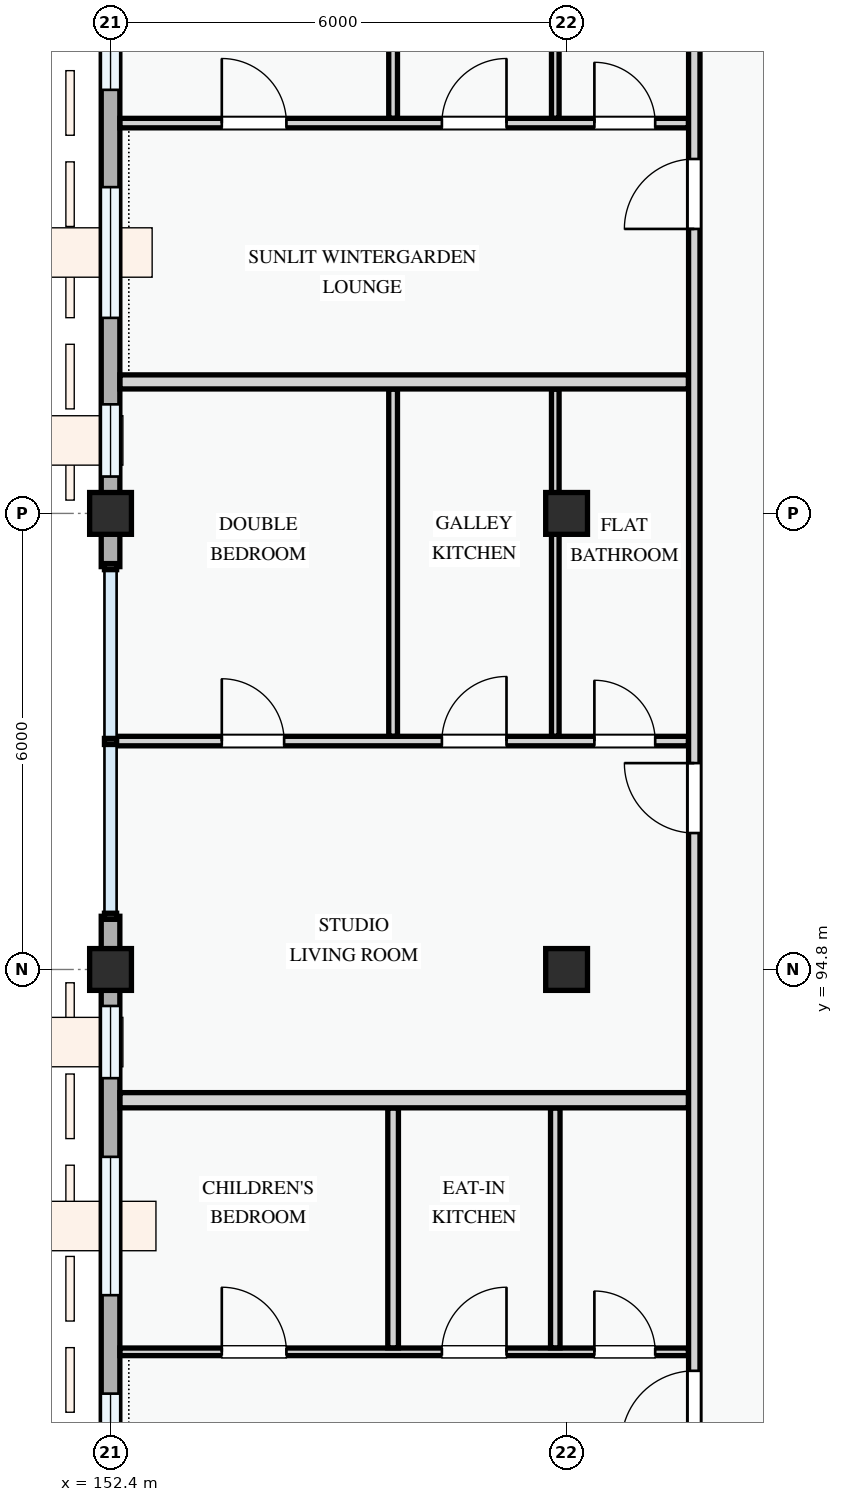
"""IFC4 building model, lengths in metres.
Left out: names, types, materials, properties, quantities, classifications, styles, units other than length and angle.
Written with IfcOpenShell. Run it as: python <this file> out.ifc"""

import sys

from ifc_helpers import new_model, si_unit, direction, frame, frame_2d, origin, origin_2d, place, context, subcontext, project, spatial, rectangle, extrude, element, fill, save


model = new_model("IFC4")
c1 = context("Model", 3, precision=1e-05, world=origin(), true_north=direction((0.0, 1.0)))
c2 = subcontext(c1, "Body", "Model", "MODEL_VIEW")
j1 = project(units=[si_unit("LENGTHUNIT", "METRE"), si_unit("PLANEANGLEUNIT", "RADIAN")], contexts=[c1])
p1 = place(None, origin())
s1 = spatial("IfcSite", under=j1, at=p1, CompositionType="ELEMENT")
p2 = place(p1, origin())
s2 = spatial("IfcBuilding", under=s1, at=p2, CompositionType="ELEMENT")
p3 = place(p2, frame((0.0, 0.0, 37.8)))
s3 = spatial("IfcBuildingStorey", under=s2, at=p3, CompositionType="ELEMENT", Elevation=37.8)
for number, where, z_axis, x_axis in (
    (1, (152.4, 94.8, 0.0), (0.0, 0.0, 1.0), (1.0, 0.0, 0.0)),
    (2, (152.4, 100.8, 0.0), (0.0, 0.0, 1.0), (1.0, 0.0, 0.0)),
    (3, (158.4, 94.8, 0.0), (0.0, 0.0, 1.0), (1.0, 0.0, 0.0)),
    (4, (158.4, 100.8, 0.0), (0.0, 0.0, 1.0), (1.0, 0.0, 0.0)),
):
    element("IfcColumn", number, at=place(p3, frame(where, z_axis=z_axis, x_axis=x_axis)), inside=s3, PredefinedType="COLUMN", context=c2, shape_type="SweptSolid", body=[
        extrude(rectangle(XDim=0.55, YDim=0.55, at=origin_2d()), origin(), (0.0, 0.0, 1.0), 3.3),
    ])
p4 = place(p3, frame((152.4, 109.2, 0.0), z_axis=(0.0, 0.0, 1.0), x_axis=(0.0, -1.0, 0.0)))
e5 = element("IfcWall", 5, at=p4, inside=s3, PredefinedType="STANDARD", context=c2, shape_type="SweptSolid", body=[
    extrude(rectangle(XDim=8.4, YDim=0.245, at=frame_2d((4.2, 0.0))), origin(), (0.0, 0.0, 1.0), 2.425),
])
p5 = place(p4, frame((0.627, 0.0, 0.78)))
e6 = element("IfcOpeningElement", 6, at=p5, cuts=e5, PredefinedType="OPENING", context=c2, shape_type="SweptSolid", body=[
    extrude(rectangle(XDim=2.2, YDim=1.5, at=frame_2d((1.1, 0.75))), frame((0.0, 0.133, 0.0), z_axis=(0.0, -1.0, 0.0), x_axis=(1.0, 0.0, 0.0)), (0.0, 0.0, 1.0), 0.265),
])
p6 = place(p4, frame((4.107, 0.0, 0.78)))
e7 = element("IfcOpeningElement", 7, at=p6, cuts=e5, PredefinedType="OPENING", context=c2, shape_type="SweptSolid", body=[
    extrude(rectangle(XDim=1.72, YDim=1.52, at=frame_2d((0.86, 0.76))), frame((0.0, 0.133, 0.0), z_axis=(0.0, -1.0, 0.0), x_axis=(1.0, 0.0, 0.0)), (0.0, 0.0, 1.0), 0.265),
])
p7 = place(p4, frame((6.965, 0.0, 0.78)))
e8 = element("IfcOpeningElement", 8, at=p7, cuts=e5, PredefinedType="OPENING", context=c2, shape_type="SweptSolid", body=[
    extrude(rectangle(XDim=0.95, YDim=1.15, at=frame_2d((0.475, 0.575))), frame((0.0, 0.133, 0.0), z_axis=(0.0, -1.0, 0.0), x_axis=(1.0, 0.0, 0.0)), (0.0, 0.0, 1.0), 0.265),
])
for number, where, z_axis, x_axis in (
    (9, (152.4, 100.8, 0.0), (0.0, 0.0, 1.0), (0.0, -1.0, 0.0)),
    (10, (152.4, 95.5, 0.0), (0.0, 0.0, 1.0), (0.0, -1.0, 0.0)),
):
    element("IfcWall", number, at=place(p3, frame(where, z_axis=z_axis, x_axis=x_axis)), inside=s3, PredefinedType="STANDARD", context=c2, shape_type="SweptSolid", body=[
        extrude(rectangle(XDim=0.7, YDim=0.245, at=frame_2d((0.35, 0.0))), origin(), (0.0, 0.0, 1.0), 2.575),
    ])
p8 = place(p3, frame((152.4, 94.8, 0.0), z_axis=(0.0, 0.0, 1.0), x_axis=(0.0, -1.0, 0.0)))
e11 = element("IfcWall", 11, at=p8, inside=s3, PredefinedType="STANDARD", context=c2, shape_type="SweptSolid", body=[
    extrude(rectangle(XDim=8.4, YDim=0.245, at=frame_2d((4.2, 0.0))), origin(), (0.0, 0.0, 1.0), 2.425),
])
p9 = place(p8, frame((0.48, 0.0, 0.78)))
e12 = element("IfcOpeningElement", 12, at=p9, cuts=e11, PredefinedType="OPENING", context=c2, shape_type="SweptSolid", body=[
    extrude(rectangle(XDim=0.95, YDim=1.15, at=frame_2d((0.475, 0.575))), frame((0.0, 0.133, 0.0), z_axis=(0.0, -1.0, 0.0), x_axis=(1.0, 0.0, 0.0)), (0.0, 0.0, 1.0), 0.265),
])
p10 = place(p8, frame((2.465, 0.0, 0.78)))
e13 = element("IfcOpeningElement", 13, at=p10, cuts=e11, PredefinedType="OPENING", context=c2, shape_type="SweptSolid", body=[
    extrude(rectangle(XDim=1.82, YDim=1.46, at=frame_2d((0.91, 0.73))), frame((0.0, 0.133, 0.0), z_axis=(0.0, -1.0, 0.0), x_axis=(1.0, 0.0, 0.0)), (0.0, 0.0, 1.0), 0.265),
])
p11 = place(p8, frame((5.58, 0.0, 0.78)))
e14 = element("IfcOpeningElement", 14, at=p11, cuts=e11, PredefinedType="OPENING", context=c2, shape_type="SweptSolid", body=[
    extrude(rectangle(XDim=2.08, YDim=1.52, at=frame_2d((1.04, 0.76))), frame((0.0, 0.133, 0.0), z_axis=(0.0, -1.0, 0.0), x_axis=(1.0, 0.0, 0.0)), (0.0, 0.0, 1.0), 0.265),
])
p12 = place(p3, frame((152.524, 89.77, 0.0), z_axis=(0.0, 0.0, 1.0), x_axis=(1.0, 0.0, 0.0)))
e15 = element("IfcWall", 15, at=p12, inside=s3, PredefinedType="PARTITIONING", context=c2, shape_type="SweptSolid", body=[
    extrude(rectangle(XDim=7.479, YDim=0.1, at=frame_2d((3.739, 0.0))), origin(), (0.0, 0.0, 1.0), 3.0),
])
p13 = place(p12, frame((1.339, 0.0, 0.0)))
e16 = element("IfcOpeningElement", 16, at=p13, cuts=e15, PredefinedType="OPENING", context=c2, shape_type="SweptSolid", body=[
    extrude(rectangle(XDim=0.85, YDim=2.1, at=frame_2d((0.425, 1.05))), frame((0.0, 0.06, 0.0), z_axis=(0.0, -1.0, 0.0), x_axis=(1.0, 0.0, 0.0)), (0.0, 0.0, 1.0), 0.12),
])
p14 = place(p12, frame((4.235, 0.0, 0.0)))
e17 = element("IfcOpeningElement", 17, at=p14, cuts=e15, PredefinedType="OPENING", context=c2, shape_type="SweptSolid", body=[
    extrude(rectangle(XDim=0.85, YDim=2.1, at=frame_2d((0.425, 1.05))), frame((0.0, 0.06, 0.0), z_axis=(0.0, -1.0, 0.0), x_axis=(1.0, 0.0, 0.0)), (0.0, 0.0, 1.0), 0.12),
])
p15 = place(p12, frame((6.241, 0.0, 0.0)))
e18 = element("IfcOpeningElement", 18, at=p15, cuts=e15, PredefinedType="OPENING", context=c2, shape_type="SweptSolid", body=[
    extrude(rectangle(XDim=0.8, YDim=2.1, at=frame_2d((0.4, 1.05))), frame((0.0, 0.06, 0.0), z_axis=(0.0, -1.0, 0.0), x_axis=(1.0, 0.0, 0.0)), (0.0, 0.0, 1.0), 0.12),
])
p16 = place(p3, frame((156.118, 89.822, 0.0), z_axis=(0.0, 0.0, 1.0), x_axis=(0.0, 1.0, 0.0)))
e19 = element("IfcWall", 19, at=p16, inside=s3, PredefinedType="PARTITIONING", context=c2, shape_type="SweptSolid", body=[
    extrude(rectangle(XDim=3.156, YDim=0.14, at=frame_2d((1.578, 0.0))), origin(), (0.0, 0.0, 1.0), 3.0),
])
p17 = place(p3, frame((158.251, 89.822, 0.0), z_axis=(0.0, 0.0, 1.0), x_axis=(0.0, 1.0, 0.0)))
e20 = element("IfcWall", 20, at=p17, inside=s3, PredefinedType="PARTITIONING", context=c2, shape_type="SweptSolid", body=[
    extrude(rectangle(XDim=3.156, YDim=0.125, at=frame_2d((1.578, 0.0))), origin(), (0.0, 0.0, 1.0), 2.425),
])
p18 = place(p3, frame((152.46, 97.805, 0.0), z_axis=(0.0, 0.0, 1.0), x_axis=(1.0, 0.0, 0.0)))
e21 = element("IfcWall", 21, at=p18, inside=s3, PredefinedType="PARTITIONING", context=c2, shape_type="SweptSolid", body=[
    extrude(rectangle(XDim=7.543, YDim=0.125, at=frame_2d((3.771, 0.0))), origin(), (0.0, 0.0, 1.0), 3.0),
])
p19 = place(p18, frame((1.404, 0.0, 0.0)))
e22 = element("IfcOpeningElement", 22, at=p19, cuts=e21, PredefinedType="OPENING", context=c2, shape_type="SweptSolid", body=[
    extrude(rectangle(XDim=0.82, YDim=2.08, at=frame_2d((0.41, 1.04))), frame((0.0, 0.073, 0.0), z_axis=(0.0, -1.0, 0.0), x_axis=(1.0, 0.0, 0.0)), (0.0, 0.0, 1.0), 0.145),
])
p20 = place(p18, frame((4.299, 0.0, 0.0)))
e23 = element("IfcOpeningElement", 23, at=p20, cuts=e21, PredefinedType="OPENING", context=c2, shape_type="SweptSolid", body=[
    extrude(rectangle(XDim=0.85, YDim=2.1, at=frame_2d((0.425, 1.05))), frame((0.0, 0.073, 0.0), z_axis=(0.0, -1.0, 0.0), x_axis=(1.0, 0.0, 0.0)), (0.0, 0.0, 1.0), 0.145),
])
p21 = place(p18, frame((6.306, 0.0, 0.0)))
e24 = element("IfcOpeningElement", 24, at=p21, cuts=e21, PredefinedType="OPENING", context=c2, shape_type="SweptSolid", body=[
    extrude(rectangle(XDim=0.8, YDim=2.1, at=frame_2d((0.4, 1.05))), frame((0.0, 0.073, 0.0), z_axis=(0.0, -1.0, 0.0), x_axis=(1.0, 0.0, 0.0)), (0.0, 0.0, 1.0), 0.145),
])
p22 = place(p3, frame((156.118, 97.869, 0.0), z_axis=(0.0, 0.0, 1.0), x_axis=(0.0, 1.0, 0.0)))
e25 = element("IfcWall", 25, at=p22, inside=s3, PredefinedType="PARTITIONING", context=c2, shape_type="SweptSolid", body=[
    extrude(rectangle(XDim=4.566, YDim=0.115, at=frame_2d((2.283, 0.0))), origin(), (0.0, 0.0, 1.0), 3.0),
])
p23 = place(p3, frame((158.251, 97.869, 0.0), z_axis=(0.0, 0.0, 1.0), x_axis=(0.0, 1.0, 0.0)))
e26 = element("IfcWall", 26, at=p23, inside=s3, PredefinedType="PARTITIONING", context=c2, shape_type="SweptSolid", body=[
    extrude(rectangle(XDim=4.566, YDim=0.1, at=frame_2d((2.283, 0.0))), origin(), (0.0, 0.0, 1.0), 2.425),
])
p24 = place(p3, frame((152.524, 93.08, 0.0), z_axis=(0.0, 0.0, 1.0), x_axis=(1.0, 0.0, 0.0)))
e27 = element("IfcWall", 27, at=p24, inside=s3, PredefinedType="PARTITIONING", context=c2, shape_type="SweptSolid", body=[
    extrude(rectangle(XDim=7.479, YDim=0.2, at=frame_2d((3.739, 0.0))), origin(), (0.0, 0.0, 1.0), 3.0),
])
p25 = place(p3, frame((152.524, 105.935, 0.0), z_axis=(0.0, 0.0, 1.0), x_axis=(1.0, 0.0, 0.0)))
e28 = element("IfcWall", 28, at=p25, inside=s3, PredefinedType="PARTITIONING", context=c2, shape_type="SweptSolid", body=[
    extrude(rectangle(XDim=7.479, YDim=0.125, at=frame_2d((3.739, 0.0))), origin(), (0.0, 0.0, 1.0), 3.0),
])
p26 = place(p25, frame((1.339, 0.0, 0.0)))
e29 = element("IfcOpeningElement", 29, at=p26, cuts=e28, PredefinedType="OPENING", context=c2, shape_type="SweptSolid", body=[
    extrude(rectangle(XDim=0.85, YDim=2.1, at=frame_2d((0.425, 1.05))), frame((0.0, 0.073, 0.0), z_axis=(0.0, -1.0, 0.0), x_axis=(1.0, 0.0, 0.0)), (0.0, 0.0, 1.0), 0.145),
])
p27 = place(p25, frame((4.235, 0.0, 0.0)))
e30 = element("IfcOpeningElement", 30, at=p27, cuts=e28, PredefinedType="OPENING", context=c2, shape_type="SweptSolid", body=[
    extrude(rectangle(XDim=0.85, YDim=2.1, at=frame_2d((0.425, 1.05))), frame((0.0, 0.073, 0.0), z_axis=(0.0, -1.0, 0.0), x_axis=(1.0, 0.0, 0.0)), (0.0, 0.0, 1.0), 0.145),
])
p28 = place(p25, frame((6.241, 0.0, 0.0)))
e31 = element("IfcOpeningElement", 31, at=p28, cuts=e28, PredefinedType="OPENING", context=c2, shape_type="SweptSolid", body=[
    extrude(rectangle(XDim=0.8, YDim=2.1, at=frame_2d((0.4, 1.05))), frame((0.0, 0.073, 0.0), z_axis=(0.0, -1.0, 0.0), x_axis=(1.0, 0.0, 0.0)), (0.0, 0.0, 1.0), 0.145),
])
p29 = place(p3, frame((156.118, 106.0, 0.0), z_axis=(0.0, 0.0, 1.0), x_axis=(0.0, 1.0, 0.0)))
e32 = element("IfcWall", 32, at=p29, inside=s3, PredefinedType="PARTITIONING", context=c2, shape_type="SweptSolid", body=[
    extrude(rectangle(XDim=3.229, YDim=0.115, at=frame_2d((1.614, 0.0))), origin(), (0.0, 0.0, 1.0), 3.0),
])
p30 = place(p3, frame((158.251, 106.0, 0.0), z_axis=(0.0, 0.0, 1.0), x_axis=(0.0, 1.0, 0.0)))
e33 = element("IfcWall", 33, at=p30, inside=s3, PredefinedType="PARTITIONING", context=c2, shape_type="SweptSolid", body=[
    extrude(rectangle(XDim=3.229, YDim=0.1, at=frame_2d((1.614, 0.0))), origin(), (0.0, 0.0, 1.0), 2.425),
])
p31 = place(p3, frame((152.524, 102.53, 0.0), z_axis=(0.0, 0.0, 1.0), x_axis=(1.0, 0.0, 0.0)))
e34 = element("IfcWall", 34, at=p31, inside=s3, PredefinedType="PARTITIONING", context=c2, shape_type="SweptSolid", body=[
    extrude(rectangle(XDim=7.479, YDim=0.185, at=frame_2d((3.739, 0.0))), origin(), (0.0, 0.0, 1.0), 3.0),
])
p32 = place(p3, frame((160.08, 86.46, 0.0), z_axis=(0.0, 0.0, 1.0), x_axis=(0.0, 1.0, 0.0)))
e35 = element("IfcWall", 35, at=p32, inside=s3, PredefinedType="PARTITIONING", context=c2, shape_type="SweptSolid", body=[
    extrude(rectangle(XDim=22.88, YDim=0.15, at=frame_2d((11.44, 0.0))), origin(), (0.0, 0.0, 1.0), 3.0),
])
p33 = place(p32, frame((2.1, 0.0, 0.0)))
e36 = element("IfcOpeningElement", 36, at=p33, cuts=e35, PredefinedType="OPENING", context=c2, shape_type="SweptSolid", body=[
    extrude(rectangle(XDim=0.96, YDim=2.12, at=frame_2d((0.48, 1.06))), frame((0.0, 0.085, 0.0), z_axis=(0.0, -1.0, 0.0), x_axis=(1.0, 0.0, 0.0)), (0.0, 0.0, 1.0), 0.17),
])
p34 = place(p32, frame((10.135, 0.0, 0.0)))
e37 = element("IfcOpeningElement", 37, at=p34, cuts=e35, PredefinedType="OPENING", context=c2, shape_type="SweptSolid", body=[
    extrude(rectangle(XDim=0.92, YDim=2.1, at=frame_2d((0.46, 1.05))), frame((0.0, 0.085, 0.0), z_axis=(0.0, -1.0, 0.0), x_axis=(1.0, 0.0, 0.0)), (0.0, 0.0, 1.0), 0.17),
])
p35 = place(p32, frame((18.083, 0.0, 0.0)))
e38 = element("IfcOpeningElement", 38, at=p35, cuts=e35, PredefinedType="OPENING", context=c2, shape_type="SweptSolid", body=[
    extrude(rectangle(XDim=0.92, YDim=2.1, at=frame_2d((0.46, 1.05))), frame((0.0, 0.085, 0.0), z_axis=(0.0, -1.0, 0.0), x_axis=(1.0, 0.0, 0.0)), (0.0, 0.0, 1.0), 0.17),
])
p36 = place(p5, origin())
e39 = element("IfcWindow", 39, at=p36, inside=s3, PartitioningType="DOUBLE_PANEL_VERTICAL", PredefinedType="WINDOW", context=c2, shape_type="SweptSolid", body=[
    extrude(rectangle(XDim=2.2, YDim=1.5, at=frame_2d((1.1, 0.75))), frame((0.0, 0.03, 0.0), z_axis=(0.0, -1.0, 0.0), x_axis=(1.0, 0.0, 0.0)), (0.0, 0.0, 1.0), 0.06),
])
fill(e6, e39)
p37 = place(p6, origin())
e40 = element("IfcWindow", 40, at=p37, inside=s3, PartitioningType="DOUBLE_PANEL_VERTICAL", PredefinedType="WINDOW", context=c2, shape_type="SweptSolid", body=[
    extrude(rectangle(XDim=1.72, YDim=1.52, at=frame_2d((0.86, 0.76))), frame((0.0, 0.03, 0.0), z_axis=(0.0, -1.0, 0.0), x_axis=(1.0, 0.0, 0.0)), (0.0, 0.0, 1.0), 0.06),
])
fill(e7, e40)
p38 = place(p7, origin())
e41 = element("IfcWindow", 41, at=p38, inside=s3, PartitioningType="SINGLE_PANEL", PredefinedType="WINDOW", context=c2, shape_type="SweptSolid", body=[
    extrude(rectangle(XDim=0.95, YDim=1.15, at=frame_2d((0.475, 0.575))), frame((0.0, 0.03, 0.0), z_axis=(0.0, -1.0, 0.0), x_axis=(1.0, 0.0, 0.0)), (0.0, 0.0, 1.0), 0.06),
])
fill(e8, e41)
p39 = place(p9, origin())
e42 = element("IfcWindow", 42, at=p39, inside=s3, PartitioningType="SINGLE_PANEL", PredefinedType="WINDOW", context=c2, shape_type="SweptSolid", body=[
    extrude(rectangle(XDim=0.95, YDim=1.15, at=frame_2d((0.475, 0.575))), frame((0.0, 0.03, 0.0), z_axis=(0.0, -1.0, 0.0), x_axis=(1.0, 0.0, 0.0)), (0.0, 0.0, 1.0), 0.06),
])
fill(e12, e42)
p40 = place(p10, origin())
e43 = element("IfcWindow", 43, at=p40, inside=s3, PartitioningType="DOUBLE_PANEL_VERTICAL", PredefinedType="WINDOW", context=c2, shape_type="SweptSolid", body=[
    extrude(rectangle(XDim=1.82, YDim=1.46, at=frame_2d((0.91, 0.73))), frame((0.0, 0.03, 0.0), z_axis=(0.0, -1.0, 0.0), x_axis=(1.0, 0.0, 0.0)), (0.0, 0.0, 1.0), 0.06),
])
fill(e13, e43)
p41 = place(p11, origin())
e44 = element("IfcWindow", 44, at=p41, inside=s3, PartitioningType="DOUBLE_PANEL_VERTICAL", PredefinedType="WINDOW", context=c2, shape_type="SweptSolid", body=[
    extrude(rectangle(XDim=2.08, YDim=1.52, at=frame_2d((1.04, 0.76))), frame((0.0, 0.03, 0.0), z_axis=(0.0, -1.0, 0.0), x_axis=(1.0, 0.0, 0.0)), (0.0, 0.0, 1.0), 0.06),
])
fill(e14, e44)
p42 = place(p13, origin())
e45 = element("IfcDoor", 45, at=p42, inside=s3, OperationType="SINGLE_SWING_LEFT", PredefinedType="DOOR", context=c2, shape_type="SweptSolid", body=[
    extrude(rectangle(XDim=0.85, YDim=2.1, at=frame_2d((0.425, 1.05))), frame((0.0, 0.025, 0.0), z_axis=(0.0, -1.0, 0.0), x_axis=(1.0, 0.0, 0.0)), (0.0, 0.0, 1.0), 0.05),
])
fill(e16, e45)
p43 = place(p14, origin())
e46 = element("IfcDoor", 46, at=p43, inside=s3, OperationType="SINGLE_SWING_RIGHT", PredefinedType="DOOR", context=c2, shape_type="SweptSolid", body=[
    extrude(rectangle(XDim=0.85, YDim=2.1, at=frame_2d((0.425, 1.05))), frame((0.0, 0.025, 0.0), z_axis=(0.0, -1.0, 0.0), x_axis=(1.0, 0.0, 0.0)), (0.0, 0.0, 1.0), 0.05),
])
fill(e17, e46)
p44 = place(p15, origin())
e47 = element("IfcDoor", 47, at=p44, inside=s3, OperationType="SINGLE_SWING_LEFT", PredefinedType="DOOR", context=c2, shape_type="SweptSolid", body=[
    extrude(rectangle(XDim=0.8, YDim=2.1, at=frame_2d((0.4, 1.05))), frame((0.0, 0.025, 0.0), z_axis=(0.0, -1.0, 0.0), x_axis=(1.0, 0.0, 0.0)), (0.0, 0.0, 1.0), 0.05),
])
fill(e18, e47)
p45 = place(p19, origin())
e48 = element("IfcDoor", 48, at=p45, inside=s3, OperationType="SINGLE_SWING_LEFT", PredefinedType="DOOR", context=c2, shape_type="SweptSolid", body=[
    extrude(rectangle(XDim=0.82, YDim=2.08, at=frame_2d((0.41, 1.04))), frame((0.0, 0.025, 0.0), z_axis=(0.0, -1.0, 0.0), x_axis=(1.0, 0.0, 0.0)), (0.0, 0.0, 1.0), 0.05),
])
fill(e22, e48)
p46 = place(p20, origin())
e49 = element("IfcDoor", 49, at=p46, inside=s3, OperationType="SINGLE_SWING_RIGHT", PredefinedType="DOOR", context=c2, shape_type="SweptSolid", body=[
    extrude(rectangle(XDim=0.85, YDim=2.1, at=frame_2d((0.425, 1.05))), frame((0.0, 0.025, 0.0), z_axis=(0.0, -1.0, 0.0), x_axis=(1.0, 0.0, 0.0)), (0.0, 0.0, 1.0), 0.05),
])
fill(e23, e49)
p47 = place(p21, origin())
e50 = element("IfcDoor", 50, at=p47, inside=s3, OperationType="SINGLE_SWING_LEFT", PredefinedType="DOOR", context=c2, shape_type="SweptSolid", body=[
    extrude(rectangle(XDim=0.8, YDim=2.1, at=frame_2d((0.4, 1.05))), frame((0.0, 0.025, 0.0), z_axis=(0.0, -1.0, 0.0), x_axis=(1.0, 0.0, 0.0)), (0.0, 0.0, 1.0), 0.05),
])
fill(e24, e50)
p48 = place(p26, origin())
e51 = element("IfcDoor", 51, at=p48, inside=s3, OperationType="SINGLE_SWING_LEFT", PredefinedType="DOOR", context=c2, shape_type="SweptSolid", body=[
    extrude(rectangle(XDim=0.85, YDim=2.1, at=frame_2d((0.425, 1.05))), frame((0.0, 0.025, 0.0), z_axis=(0.0, -1.0, 0.0), x_axis=(1.0, 0.0, 0.0)), (0.0, 0.0, 1.0), 0.05),
])
fill(e29, e51)
p49 = place(p27, origin())
e52 = element("IfcDoor", 52, at=p49, inside=s3, OperationType="SINGLE_SWING_RIGHT", PredefinedType="DOOR", context=c2, shape_type="SweptSolid", body=[
    extrude(rectangle(XDim=0.85, YDim=2.1, at=frame_2d((0.425, 1.05))), frame((0.0, 0.025, 0.0), z_axis=(0.0, -1.0, 0.0), x_axis=(1.0, 0.0, 0.0)), (0.0, 0.0, 1.0), 0.05),
])
fill(e30, e52)
p50 = place(p28, origin())
e53 = element("IfcDoor", 53, at=p50, inside=s3, OperationType="SINGLE_SWING_LEFT", PredefinedType="DOOR", context=c2, shape_type="SweptSolid", body=[
    extrude(rectangle(XDim=0.8, YDim=2.1, at=frame_2d((0.4, 1.05))), frame((0.0, 0.025, 0.0), z_axis=(0.0, -1.0, 0.0), x_axis=(1.0, 0.0, 0.0)), (0.0, 0.0, 1.0), 0.05),
])
fill(e31, e53)
p51 = place(p33, origin())
e54 = element("IfcDoor", 54, at=p51, inside=s3, OperationType="SINGLE_SWING_LEFT", PredefinedType="DOOR", context=c2, shape_type="SweptSolid", body=[
    extrude(rectangle(XDim=0.96, YDim=2.12, at=frame_2d((0.48, 1.06))), frame((0.0, 0.025, 0.0), z_axis=(0.0, -1.0, 0.0), x_axis=(1.0, 0.0, 0.0)), (0.0, 0.0, 1.0), 0.05),
])
fill(e36, e54)
p52 = place(p34, origin())
e55 = element("IfcDoor", 55, at=p52, inside=s3, OperationType="SINGLE_SWING_RIGHT", PredefinedType="DOOR", context=c2, shape_type="SweptSolid", body=[
    extrude(rectangle(XDim=0.92, YDim=2.1, at=frame_2d((0.46, 1.05))), frame((0.0, 0.025, 0.0), z_axis=(0.0, -1.0, 0.0), x_axis=(1.0, 0.0, 0.0)), (0.0, 0.0, 1.0), 0.05),
])
fill(e37, e55)
p53 = place(p35, origin())
e56 = element("IfcDoor", 56, at=p53, inside=s3, OperationType="SINGLE_SWING_LEFT", PredefinedType="DOOR", context=c2, shape_type="SweptSolid", body=[
    extrude(rectangle(XDim=0.92, YDim=2.1, at=frame_2d((0.46, 1.05))), frame((0.0, 0.025, 0.0), z_axis=(0.0, -1.0, 0.0), x_axis=(1.0, 0.0, 0.0)), (0.0, 0.0, 1.0), 0.05),
])
fill(e38, e56)
save(model, sys.argv[1])
